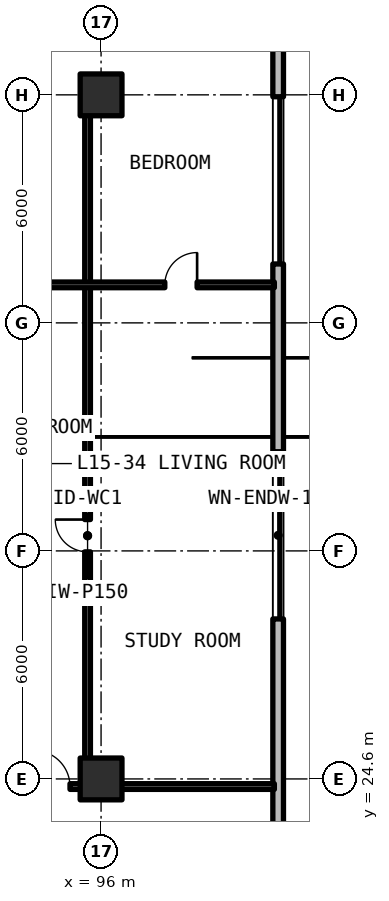
"""IFC4 building model, lengths in metres.
Left out: names, types, materials, properties, quantities, classifications, styles, units other than length and angle.
Written with IfcOpenShell. Run it as: python <this file> out.ifc"""

import sys

from ifc_helpers import new_model, si_unit, direction, frame, frame_2d, origin, origin_2d, place, context, subcontext, project, spatial, rectangle, extrude, element, fill, save


model = new_model("IFC4")
c1 = context("Model", 3, precision=1e-05, world=origin(), true_north=direction((0.0, 1.0)))
c2 = subcontext(c1, "Body", "Model", "MODEL_VIEW")
j1 = project(units=[si_unit("LENGTHUNIT", "METRE"), si_unit("PLANEANGLEUNIT", "RADIAN")], contexts=[c1])
p1 = place(None, origin())
s1 = spatial("IfcSite", under=j1, at=p1, CompositionType="ELEMENT")
p2 = place(p1, origin())
s2 = spatial("IfcBuilding", under=s1, at=p2, CompositionType="ELEMENT")
p3 = place(p2, frame((0.0, 0.0, 55.44)))
s3 = spatial("IfcBuildingStorey", under=s2, at=p3, CompositionType="ELEMENT", Elevation=55.44)
for number, where, z_axis, x_axis in (
    (1, (96.0, 24.6, 0.0), (0.0, 0.0, 1.0), (1.0, 0.0, 0.0)),
    (2, (96.0, 42.6, 0.0), (0.0, 0.0, 1.0), (1.0, 0.0, 0.0)),
):
    element("IfcColumn", number, at=place(p3, frame(where, z_axis=z_axis, x_axis=x_axis)), inside=s3, PredefinedType="COLUMN", context=c2, shape_type="SweptSolid", body=[
        extrude(rectangle(XDim=1.1, YDim=1.1, at=origin_2d()), origin(), (0.0, 0.0, 1.0), 3.3),
    ])
p4 = place(p3, frame((100.66, 11.858, 0.0), z_axis=(0.0, 0.0, 1.0), x_axis=(0.0, 1.0, 0.0)))
e3 = element("IfcWall", 3, at=p4, inside=s3, PredefinedType="SOLIDWALL", context=c2, shape_type="SweptSolid", body=[
    extrude(rectangle(XDim=43.484, YDim=0.28, at=frame_2d((21.742, 0.0))), origin(), (0.0, 0.0, 1.0), 3.08),
])
p5 = place(p4, frame((16.952, 0.0, 0.78)))
e4 = element("IfcOpeningElement", 4, at=p5, cuts=e3, PredefinedType="OPENING", context=c2, shape_type="SweptSolid", body=[
    extrude(rectangle(XDim=4.4, YDim=1.66, at=frame_2d((2.2, 0.83))), frame((0.0, 0.15, 0.0), z_axis=(0.0, -1.0, 0.0), x_axis=(1.0, 0.0, 0.0)), (0.0, 0.0, 1.0), 0.3),
])
p6 = place(p4, frame((26.292, 0.0, 0.78)))
e5 = element("IfcOpeningElement", 5, at=p6, cuts=e3, PredefinedType="OPENING", context=c2, shape_type="SweptSolid", body=[
    extrude(rectangle(XDim=4.4, YDim=1.66, at=frame_2d((2.2, 0.83))), frame((0.0, 0.15, 0.0), z_axis=(0.0, -1.0, 0.0), x_axis=(1.0, 0.0, 0.0)), (0.0, 0.0, 1.0), 0.3),
])
p7 = place(p4, frame((1.511, 0.0, 0.78)))
e6 = element("IfcOpeningElement", 6, at=p7, cuts=e3, PredefinedType="OPENING", context=c2, shape_type="SweptSolid", body=[
    extrude(rectangle(XDim=4.4, YDim=1.66, at=frame_2d((2.2, 0.83))), frame((0.0, 0.15, 0.0), z_axis=(0.0, -1.0, 0.0), x_axis=(1.0, 0.0, 0.0)), (0.0, 0.0, 1.0), 0.3),
])
p8 = place(p3, frame((95.645, 24.4, 0.0), z_axis=(0.0, 0.0, 1.0), x_axis=(0.0, 1.0, 0.0)))
e7 = element("IfcWall", 7, at=p8, inside=s3, PredefinedType="PARTITIONING", context=c2, shape_type="SweptSolid", body=[
    extrude(rectangle(XDim=13.2, YDim=0.15, at=frame_2d((6.6, 0.0))), origin(), (0.0, 0.0, 1.0), 2.35),
])
p9 = place(p8, frame((6.175, 0.0, 0.0)))
e8 = element("IfcOpeningElement", 8, at=p9, cuts=e7, PredefinedType="OPENING", context=c2, shape_type="SweptSolid", body=[
    extrude(rectangle(XDim=0.85, YDim=2.1, at=frame_2d((0.425, 1.05))), frame((0.0, 0.085, 0.0), z_axis=(0.0, -1.0, 0.0), x_axis=(1.0, 0.0, 0.0)), (0.0, 0.0, 1.0), 0.17),
])
p10 = place(p3, frame((95.645, 37.6, 0.0), z_axis=(0.0, 0.0, 1.0), x_axis=(0.0, 1.0, 0.0)))
e9 = element("IfcWall", 9, at=p10, inside=s3, PredefinedType="PARTITIONING", context=c2, shape_type="SweptSolid", body=[
    extrude(rectangle(XDim=5.2, YDim=0.15, at=frame_2d((2.6, 0.0))), origin(), (0.0, 0.0, 1.0), 2.35),
])
p11 = place(p3, frame((90.32, 37.6, 0.0), z_axis=(0.0, 0.0, 1.0), x_axis=(1.0, 0.0, 0.0)))
e10 = element("IfcWall", 10, at=p11, inside=s3, PredefinedType="PARTITIONING", context=c2, shape_type="SweptSolid", body=[
    extrude(rectangle(XDim=10.24, YDim=0.15, at=frame_2d((5.12, 0.0))), origin(), (0.0, 0.0, 1.0), 2.35),
])
p12 = place(p11, frame((3.412, 0.0, 0.0)))
e11 = element("IfcOpeningElement", 11, at=p12, cuts=e10, PredefinedType="OPENING", context=c2, shape_type="SweptSolid", body=[
    extrude(rectangle(XDim=0.85, YDim=2.1, at=frame_2d((0.425, 1.05))), frame((0.0, 0.085, 0.0), z_axis=(0.0, -1.0, 0.0), x_axis=(1.0, 0.0, 0.0)), (0.0, 0.0, 1.0), 0.17),
])
p13 = place(p11, frame((7.357, 0.0, 0.0)))
e12 = element("IfcOpeningElement", 12, at=p13, cuts=e10, PredefinedType="OPENING", context=c2, shape_type="SweptSolid", body=[
    extrude(rectangle(XDim=0.85, YDim=2.1, at=frame_2d((0.425, 1.05))), frame((0.0, 0.085, 0.0), z_axis=(0.0, -1.0, 0.0), x_axis=(1.0, 0.0, 0.0)), (0.0, 0.0, 1.0), 0.17),
])
p14 = place(p3, frame((90.32, 24.4, 0.0), z_axis=(0.0, 0.0, 1.0), x_axis=(1.0, 0.0, 0.0)))
e13 = element("IfcWall", 13, at=p14, inside=s3, PredefinedType="SOLIDWALL", context=c2, shape_type="SweptSolid", body=[
    extrude(rectangle(XDim=10.24, YDim=0.15, at=frame_2d((5.12, 0.0))), origin(), (0.0, 0.0, 1.0), 2.295),
])
p15 = place(p14, frame((3.913, 0.0, 0.0)))
e14 = element("IfcOpeningElement", 14, at=p15, cuts=e13, PredefinedType="OPENING", context=c2, shape_type="SweptSolid", body=[
    extrude(rectangle(XDim=0.95, YDim=2.15, at=frame_2d((0.475, 1.075))), frame((0.0, 0.085, 0.0), z_axis=(0.0, -1.0, 0.0), x_axis=(1.0, 0.0, 0.0)), (0.0, 0.0, 1.0), 0.17),
])
p16 = place(p5, origin())
e15 = element("IfcWindow", 15, at=p16, inside=s3, PartitioningType="SINGLE_PANEL", PredefinedType="WINDOW", context=c2, shape_type="SweptSolid", body=[
    extrude(rectangle(XDim=4.4, YDim=1.66, at=frame_2d((2.2, 0.83))), frame((0.0, 0.03, 0.0), z_axis=(0.0, -1.0, 0.0), x_axis=(1.0, 0.0, 0.0)), (0.0, 0.0, 1.0), 0.06),
])
fill(e4, e15)
p17 = place(p6, origin())
e16 = element("IfcWindow", 16, at=p17, inside=s3, PartitioningType="SINGLE_PANEL", PredefinedType="WINDOW", context=c2, shape_type="SweptSolid", body=[
    extrude(rectangle(XDim=4.4, YDim=1.66, at=frame_2d((2.2, 0.83))), frame((0.0, 0.03, 0.0), z_axis=(0.0, -1.0, 0.0), x_axis=(1.0, 0.0, 0.0)), (0.0, 0.0, 1.0), 0.06),
])
fill(e5, e16)
p18 = place(p9, origin())
e17 = element("IfcDoor", 17, at=p18, inside=s3, OperationType="SINGLE_SWING_RIGHT", PredefinedType="DOOR", context=c2, shape_type="SweptSolid", body=[
    extrude(rectangle(XDim=0.85, YDim=2.1, at=frame_2d((0.425, 1.05))), frame((0.0, 0.025, 0.0), z_axis=(0.0, -1.0, 0.0), x_axis=(1.0, 0.0, 0.0)), (0.0, 0.0, 1.0), 0.05),
])
fill(e8, e17)
p19 = place(p13, origin())
e18 = element("IfcDoor", 18, at=p19, inside=s3, OperationType="SINGLE_SWING_RIGHT", PredefinedType="DOOR", context=c2, shape_type="SweptSolid", body=[
    extrude(rectangle(XDim=0.85, YDim=2.1, at=frame_2d((0.425, 1.05))), frame((0.0, 0.025, 0.0), z_axis=(0.0, -1.0, 0.0), x_axis=(1.0, 0.0, 0.0)), (0.0, 0.0, 1.0), 0.05),
])
fill(e12, e18)
p20 = place(p15, origin())
e19 = element("IfcDoor", 19, at=p20, inside=s3, OperationType="SINGLE_SWING_LEFT", PredefinedType="DOOR", context=c2, shape_type="SweptSolid", body=[
    extrude(rectangle(XDim=0.95, YDim=2.15, at=frame_2d((0.475, 1.075))), frame((0.0, 0.025, 0.0), z_axis=(0.0, -1.0, 0.0), x_axis=(1.0, 0.0, 0.0)), (0.0, 0.0, 1.0), 0.05),
])
fill(e14, e19)
save(model, sys.argv[1])
